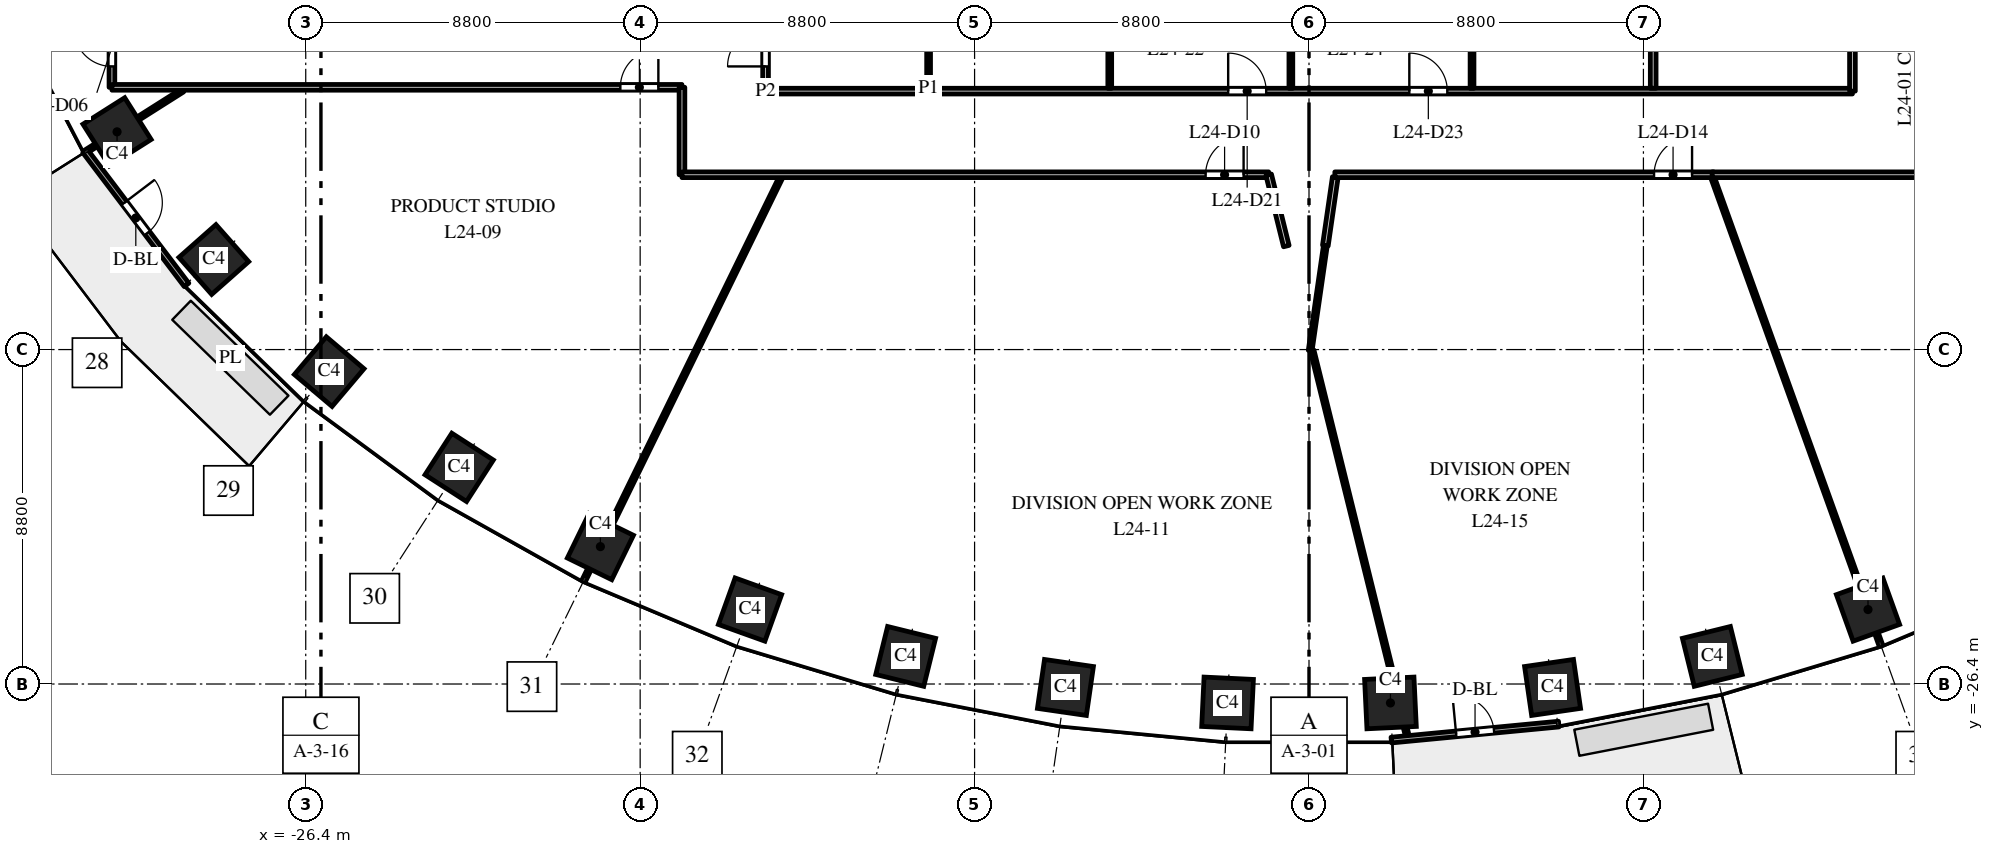
"""IFC4 building model, lengths in metres.
Left out: names, types, materials, properties, quantities, classifications, styles, units other than length and angle.
Written with IfcOpenShell. Run it as: python <this file> out.ifc"""

import sys

from ifc_helpers import new_model, si_unit, direction, frame, frame_2d, origin, origin_2d, place, context, subcontext, project, spatial, rectangle, extrude, element, fill, save


model = new_model("IFC4")
c1 = context("Model", 3, precision=1e-05, world=origin(), true_north=direction((0.0, 1.0)))
c2 = subcontext(c1, "Body", "Model", "MODEL_VIEW")
j1 = project(units=[si_unit("LENGTHUNIT", "METRE"), si_unit("PLANEANGLEUNIT", "RADIAN")], contexts=[c1])
p1 = place(None, origin())
s1 = spatial("IfcSite", under=j1, at=p1, CompositionType="ELEMENT")
p2 = place(p1, origin())
s2 = spatial("IfcBuilding", under=s1, at=p2, CompositionType="ELEMENT")
p3 = place(p2, frame((0.0, 0.0, 108.0)))
s3 = spatial("IfcBuildingStorey", under=s2, at=p3, CompositionType="ELEMENT", Elevation=108.0)
for number, where, z_axis, x_axis in (
    (1, (-31.365, -11.871, 0.0), (0.0, 0.0, 1.0), (0.535, -0.845, 0.0)),
    (2, (-28.819, -15.23, 0.0), (0.0, 0.0, 1.0), (0.663, -0.749, 0.0)),
    (3, (-25.783, -18.18, 0.0), (0.0, 0.0, 1.0), (0.763, -0.646, 0.0)),
    (4, (-22.362, -20.7, 0.0), (0.0, 0.0, 1.0), (0.84, -0.542, 0.0)),
    (5, (-18.646, -22.785, 0.0), (0.0, 0.0, 1.0), (0.898, -0.439, 0.0)),
    (6, (-14.709, -24.441, 0.0), (0.0, 0.0, 1.0), (0.941, -0.338, 0.0)),
    (7, (-10.613, -25.674, 0.0), (0.0, 0.0, 1.0), (0.971, -0.24, 0.0)),
    (8, (-6.409, -26.491, 0.0), (0.0, 0.0, 1.0), (0.99, -0.143, 0.0)),
    (9, (-2.143, -26.898, 0.0), (0.0, 0.0, 1.0), (0.999, -0.048, 0.0)),
    (10, (2.143, -26.898, 0.0), (0.0, 0.0, 1.0), (0.999, 0.048, 0.0)),
    (11, (6.409, -26.491, 0.0), (0.0, 0.0, 1.0), (0.99, 0.143, 0.0)),
    (12, (10.613, -25.674, 0.0), (0.0, 0.0, 1.0), (0.971, 0.24, 0.0)),
    (13, (14.709, -24.441, 0.0), (0.0, 0.0, 1.0), (0.941, 0.338, 0.0)),
):
    element("IfcColumn", number, at=place(p3, frame(where, z_axis=z_axis, x_axis=x_axis)), inside=s3, PredefinedType="COLUMN", context=c2, shape_type="SweptSolid", body=[
        extrude(rectangle(XDim=1.3, YDim=1.3, at=origin_2d()), origin(), (0.0, 0.0, 1.0), 4.0),
    ])
p4 = place(p3, frame((-32.208, -12.374, 0.0), z_axis=(0.0, 0.0, 1.0), x_axis=(0.604045763106, -0.796949632081, 0.0)))
e14 = element("IfcWall", 14, at=p4, inside=s3, PredefinedType="STANDARD", context=c2, shape_type="SweptSolid", body=[
    extrude(rectangle(XDim=4.423, YDim=0.15, at=frame_2d((2.212, 0.0))), origin(), (0.0, 0.0, 1.0), 3.7),
])
p5 = place(p4, frame((1.712, 0.0, 0.0)))
e15 = element("IfcOpeningElement", 15, at=p5, cuts=e14, PredefinedType="OPENING", context=c2, shape_type="SweptSolid", body=[
    extrude(rectangle(XDim=1.0, YDim=2.4, at=frame_2d((0.5, 1.2))), frame((0.0, 0.085, 0.0), z_axis=(0.0, -1.0, 0.0), x_axis=(1.0, 0.0, 0.0)), (0.0, 0.0, 1.0), 0.17),
])
p6 = place(p3, frame((2.166, -27.875, 0.0), z_axis=(0.0, 0.0, 1.0), x_axis=(0.995473879823, 0.095035543824, 0.0)))
e16 = element("IfcWall", 16, at=p6, inside=s3, PredefinedType="STANDARD", context=c2, shape_type="SweptSolid", body=[
    extrude(rectangle(XDim=4.426, YDim=0.15, at=frame_2d((2.213, 0.0))), origin(), (0.0, 0.0, 1.0), 3.7),
])
p7 = place(p6, frame((1.713, 0.0, 0.0)))
e17 = element("IfcOpeningElement", 17, at=p7, cuts=e16, PredefinedType="OPENING", context=c2, shape_type="SweptSolid", body=[
    extrude(rectangle(XDim=1.0, YDim=2.4, at=frame_2d((0.5, 1.2))), frame((0.0, 0.085, 0.0), z_axis=(0.0, -1.0, 0.0), x_axis=(1.0, 0.0, 0.0)), (0.0, 0.0, 1.0), 0.17),
])
p8 = place(p3, frame((-32.212, -12.408, 0.0), z_axis=(0.0, 0.0, 1.0), x_axis=(0.844810627195, 0.535065420467, 0.0)))
e18 = element("IfcWall", 18, at=p8, inside=s3, PredefinedType="PARTITIONING", context=c2, shape_type="SweptSolid", body=[
    extrude(rectangle(XDim=3.048, YDim=0.1, at=frame_2d((1.524, 0.0))), origin(), (0.0, 0.0, 1.0), 3.7),
])
p9 = place(p3, frame((-31.5, -10.7, 0.0), z_axis=(0.0, 0.0, 1.0), x_axis=(0.0, 1.0, 0.0)))
e19 = element("IfcWall", 19, at=p9, inside=s3, PredefinedType="PARTITIONING", context=c2, shape_type="SweptSolid", body=[
    extrude(rectangle(XDim=2.2, YDim=0.15, at=frame_2d((1.1, 0.0))), origin(), (0.0, 0.0, 1.0), 3.7),
])
p10 = place(p9, frame((0.55, 0.0, 0.0)))
e20 = element("IfcOpeningElement", 20, at=p10, cuts=e19, PredefinedType="OPENING", context=c2, shape_type="SweptSolid", body=[
    extrude(rectangle(XDim=1.0, YDim=2.1, at=frame_2d((0.5, 1.05))), frame((0.0, 0.085, 0.0), z_axis=(0.0, -1.0, 0.0), x_axis=(1.0, 0.0, 0.0)), (0.0, 0.0, 1.0), 0.17),
])
p11 = place(p3, frame((-31.5, -10.7, 0.0), z_axis=(0.0, 0.0, 1.0), x_axis=(1.0, 0.0, 0.0)))
e21 = element("IfcWall", 21, at=p11, inside=s3, PredefinedType="PARTITIONING", context=c2, shape_type="SweptSolid", body=[
    extrude(rectangle(XDim=15.0, YDim=0.15, at=frame_2d((7.5, 0.0))), origin(), (0.0, 0.0, 1.0), 3.1),
])
p12 = place(p11, frame((13.379, 0.0, 0.0)))
e22 = element("IfcOpeningElement", 22, at=p12, cuts=e21, PredefinedType="OPENING", context=c2, shape_type="SweptSolid", body=[
    extrude(rectangle(XDim=1.0, YDim=2.1, at=frame_2d((0.5, 1.05))), frame((0.0, 0.085, 0.0), z_axis=(0.0, -1.0, 0.0), x_axis=(1.0, 0.0, 0.0)), (0.0, 0.0, 1.0), 0.17),
])
p13 = place(p3, frame((-19.086, -23.685, 0.0), z_axis=(0.0, 0.0, 1.0), x_axis=(0.439199750603, 0.898389436197, 0.0)))
e23 = element("IfcWall", 23, at=p13, inside=s3, PredefinedType="PARTITIONING", context=c2, shape_type="SweptSolid", body=[
    extrude(rectangle(XDim=11.81, YDim=0.1, at=frame_2d((5.905, 0.0))), origin(), (0.0, 0.0, 1.0), 3.7),
])
p14 = place(p3, frame((-16.5, -13.0, 0.0), z_axis=(0.0, 0.0, 1.0), x_axis=(0.0, 1.0, 0.0)))
e24 = element("IfcWall", 24, at=p14, inside=s3, PredefinedType="PARTITIONING", context=c2, shape_type="SweptSolid", body=[
    extrude(rectangle(XDim=2.3, YDim=0.15, at=frame_2d((1.15, 0.0))), origin(), (0.0, 0.0, 1.0), 2.75),
])
p15 = place(p3, frame((-16.5, -13.0, 0.0), z_axis=(0.0, 0.0, 1.0), x_axis=(1.0, 0.0, 0.0)))
e25 = element("IfcWall", 25, at=p15, inside=s3, PredefinedType="PARTITIONING", context=c2, shape_type="SweptSolid", body=[
    extrude(rectangle(XDim=15.439, YDim=0.15, at=frame_2d((7.719, 0.0))), origin(), (0.0, 0.0, 1.0), 2.85),
])
p16 = place(p15, frame((13.779, 0.0, 0.0)))
e26 = element("IfcOpeningElement", 26, at=p16, cuts=e25, PredefinedType="OPENING", context=c2, shape_type="SweptSolid", body=[
    extrude(rectangle(XDim=1.0, YDim=2.1, at=frame_2d((0.5, 1.05))), frame((0.0, 0.085, 0.0), z_axis=(0.0, -1.0, 0.0), x_axis=(1.0, 0.0, 0.0)), (0.0, 0.0, 1.0), 0.17),
])
p17 = place(p3, frame((-14.3, -10.8, 0.0), z_axis=(0.0, 0.0, 1.0), x_axis=(0.0, 1.0, 0.0)))
e27 = element("IfcWall", 27, at=p17, inside=s3, PredefinedType="PARTITIONING", context=c2, shape_type="SweptSolid", body=[
    extrude(rectangle(XDim=21.6, YDim=0.15, at=frame_2d((10.8, 0.0))), origin(), (0.0, 0.0, 1.0), 2.75),
])
p18 = place(p17, frame((0.65, 0.0, 0.0)))
e28 = element("IfcOpeningElement", 28, at=p18, cuts=e27, PredefinedType="OPENING", context=c2, shape_type="SweptSolid", body=[
    extrude(rectangle(XDim=1.0, YDim=2.1, at=frame_2d((0.5, 1.05))), frame((0.0, 0.085, 0.0), z_axis=(0.0, -1.0, 0.0), x_axis=(1.0, 0.0, 0.0)), (0.0, 0.0, 1.0), 0.17),
])
p19 = place(p3, frame((-14.3, -10.8, 0.0), z_axis=(0.0, 0.0, 1.0), x_axis=(1.0, 0.0, 0.0)))
e29 = element("IfcWall", 29, at=p19, inside=s3, PredefinedType="PARTITIONING", context=c2, shape_type="SweptSolid", body=[
    extrude(rectangle(XDim=28.6, YDim=0.15, at=frame_2d((14.3, 0.0))), origin(), (0.0, 0.0, 1.0), 2.85),
])
p20 = place(p19, frame((12.173, 0.0, 0.0)))
e30 = element("IfcOpeningElement", 30, at=p20, cuts=e29, PredefinedType="OPENING", context=c2, shape_type="SweptSolid", body=[
    extrude(rectangle(XDim=1.0, YDim=2.1, at=frame_2d((0.5, 1.05))), frame((0.0, 0.085, 0.0), z_axis=(0.0, -1.0, 0.0), x_axis=(1.0, 0.0, 0.0)), (0.0, 0.0, 1.0), 0.17),
])
p21 = place(p19, frame((16.94, 0.0, 0.0)))
e31 = element("IfcOpeningElement", 31, at=p21, cuts=e29, PredefinedType="OPENING", context=c2, shape_type="SweptSolid", body=[
    extrude(rectangle(XDim=1.0, YDim=2.1, at=frame_2d((0.5, 1.05))), frame((0.0, 0.085, 0.0), z_axis=(0.0, -1.0, 0.0), x_axis=(1.0, 0.0, 0.0)), (0.0, 0.0, 1.0), 0.17),
])
p22 = place(p3, frame((-10.01, -10.725, 0.0), z_axis=(0.0, 0.0, 1.0), x_axis=(0.0, 1.0, 0.0)))
e32 = element("IfcWall", 32, at=p22, inside=s3, PredefinedType="PARTITIONING", context=c2, shape_type="SweptSolid", body=[
    extrude(rectangle(XDim=21.45, YDim=0.1, at=frame_2d((10.725, 0.0))), origin(), (0.0, 0.0, 1.0), 2.75),
])
p23 = place(p3, frame((-5.243, -10.725, 0.0), z_axis=(0.0, 0.0, 1.0), x_axis=(0.0, 1.0, 0.0)))
e33 = element("IfcWall", 33, at=p23, inside=s3, PredefinedType="PARTITIONING", context=c2, shape_type="SweptSolid", body=[
    extrude(rectangle(XDim=4.666, YDim=0.1, at=frame_2d((2.333, 0.0))), origin(), (0.0, 0.0, 1.0), 2.9),
])
p24 = place(p3, frame((-1.061, -13.0, 0.0), z_axis=(0.0, 0.0, 1.0), x_axis=(0.240039134513, -0.970763212067, 0.0)))
e34 = element("IfcWall", 34, at=p24, inside=s3, PredefinedType="PARTITIONING", context=c2, shape_type="SweptSolid", body=[
    extrude(rectangle(XDim=1.934, YDim=0.15, at=frame_2d((0.967, 0.0))), origin(), (0.0, 0.0, 1.0), 2.85),
])
p25 = place(p3, frame((-0.477, -10.725, 0.0), z_axis=(0.0, 0.0, 1.0), x_axis=(0.0, 1.0, 0.0)))
e35 = element("IfcWall", 35, at=p25, inside=s3, PredefinedType="PARTITIONING", context=c2, shape_type="SweptSolid", body=[
    extrude(rectangle(XDim=3.257, YDim=0.1, at=frame_2d((1.628, 0.0))), origin(), (0.0, 0.0, 1.0), 2.9),
])
p26 = place(p3, frame((0.031, -17.627, 0.0), z_axis=(0.0, 0.0, 1.0), x_axis=(0.143195777523, 0.989694381766, 0.0)))
e36 = element("IfcWall", 36, at=p26, inside=s3, PredefinedType="PARTITIONING", context=c2, shape_type="SweptSolid", body=[
    extrude(rectangle(XDim=2.793, YDim=0.1, at=frame_2d((1.396, 0.0))), origin(), (0.0, 0.0, 1.0), 3.7),
])
p27 = place(p3, frame((0.082, -17.625, 0.0), z_axis=(0.0, 0.0, 1.0), x_axis=(0.239733297303, -0.970838784847, 0.0)))
e37 = element("IfcWall", 37, at=p27, inside=s3, PredefinedType="PARTITIONING", context=c2, shape_type="SweptSolid", body=[
    extrude(rectangle(XDim=10.54, YDim=0.1, at=frame_2d((5.27, 0.0))), origin(), (0.0, 0.0, 1.0), 2.9),
])
p28 = place(p3, frame((0.43, -14.864, 0.0), z_axis=(0.0, 0.0, 1.0), x_axis=(0.143488136145, 0.989652037226, 0.0)))
e38 = element("IfcWall", 38, at=p28, inside=s3, PredefinedType="PARTITIONING", context=c2, shape_type="SweptSolid", body=[
    extrude(rectangle(XDim=1.819, YDim=0.15, at=frame_2d((0.909, 0.0))), origin(), (0.0, 0.0, 1.0), 3.7),
])
p29 = place(p3, frame((0.68, -13.0, 0.0), z_axis=(0.0, 0.0, 1.0), x_axis=(1.0, 0.0, 0.0)))
e39 = element("IfcWall", 39, at=p29, inside=s3, PredefinedType="PARTITIONING", context=c2, shape_type="SweptSolid", body=[
    extrude(rectangle(XDim=9.968, YDim=0.15, at=frame_2d((4.984, 0.0))), origin(), (0.0, 0.0, 1.0), 2.85),
])
p30 = place(p29, frame((8.4, 0.0, 0.0)))
e40 = element("IfcOpeningElement", 40, at=p30, cuts=e39, PredefinedType="OPENING", context=c2, shape_type="SweptSolid", body=[
    extrude(rectangle(XDim=1.0, YDim=2.1, at=frame_2d((0.5, 1.05))), frame((0.0, 0.085, 0.0), z_axis=(0.0, -1.0, 0.0), x_axis=(1.0, 0.0, 0.0)), (0.0, 0.0, 1.0), 0.17),
])
p31 = place(p3, frame((4.29, -10.725, 0.0), z_axis=(0.0, 0.0, 1.0), x_axis=(0.0, 1.0, 0.0)))
e41 = element("IfcWall", 41, at=p31, inside=s3, PredefinedType="PARTITIONING", context=c2, shape_type="SweptSolid", body=[
    extrude(rectangle(XDim=4.157, YDim=0.1, at=frame_2d((2.079, 0.0))), origin(), (0.0, 0.0, 1.0), 2.9),
])
p32 = place(p3, frame((9.057, -10.725, 0.0), z_axis=(0.0, 0.0, 1.0), x_axis=(0.0, 1.0, 0.0)))
e42 = element("IfcWall", 42, at=p32, inside=s3, PredefinedType="PARTITIONING", context=c2, shape_type="SweptSolid", body=[
    extrude(rectangle(XDim=10.68, YDim=0.15, at=frame_2d((5.34, 0.0))), origin(), (0.0, 0.0, 1.0), 2.75),
])
p33 = place(p32, frame((5.07, 0.0, 0.0)))
e43 = element("IfcOpeningElement", 43, at=p33, cuts=e42, PredefinedType="OPENING", context=c2, shape_type="SweptSolid", body=[
    extrude(rectangle(XDim=1.0, YDim=2.1, at=frame_2d((0.5, 1.05))), frame((0.0, 0.085, 0.0), z_axis=(0.0, -1.0, 0.0), x_axis=(1.0, 0.0, 0.0)), (0.0, 0.0, 1.0), 0.17),
])
p34 = place(p3, frame((10.622, -13.075, 0.0), z_axis=(0.0, 0.0, 1.0), x_axis=(0.338388305095, -0.941006564788, 0.0)))
e44 = element("IfcWall", 44, at=p34, inside=s3, PredefinedType="PARTITIONING", context=c2, shape_type="SweptSolid", body=[
    extrude(rectangle(XDim=13.08, YDim=0.1, at=frame_2d((6.54, 0.0))), origin(), (0.0, 0.0, 1.0), 2.85),
])
p35 = place(p3, frame((10.607, -13.0, 0.0), z_axis=(0.0, 0.0, 1.0), x_axis=(1.0, 0.0, 0.0)))
e45 = element("IfcWall", 45, at=p35, inside=s3, PredefinedType="PARTITIONING", context=c2, shape_type="SweptSolid", body=[
    extrude(rectangle(XDim=5.893, YDim=0.15, at=frame_2d((2.947, 0.0))), origin(), (0.0, 0.0, 1.0), 3.7),
])
p36 = place(p3, frame((14.3, -10.8, 0.0), z_axis=(0.0, 0.0, 1.0), x_axis=(0.0, 1.0, 0.0)))
e46 = element("IfcWall", 46, at=p36, inside=s3, PredefinedType="PARTITIONING", context=c2, shape_type="SweptSolid", body=[
    extrude(rectangle(XDim=21.6, YDim=0.15, at=frame_2d((10.8, 0.0))), origin(), (0.0, 0.0, 1.0), 2.75),
])
p37 = place(p36, frame((19.95, 0.0, 0.0)))
e47 = element("IfcOpeningElement", 47, at=p37, cuts=e46, PredefinedType="OPENING", context=c2, shape_type="SweptSolid", body=[
    extrude(rectangle(XDim=1.0, YDim=2.1, at=frame_2d((0.5, 1.05))), frame((0.0, 0.085, 0.0), z_axis=(0.0, -1.0, 0.0), x_axis=(1.0, 0.0, 0.0)), (0.0, 0.0, 1.0), 0.17),
])
p38 = place(p5, origin())
e48 = element("IfcDoor", 48, at=p38, inside=s3, OperationType="SINGLE_SWING_LEFT", PredefinedType="DOOR", context=c2, shape_type="SweptSolid", body=[
    extrude(rectangle(XDim=1.0, YDim=2.4, at=frame_2d((0.5, 1.2))), frame((0.0, 0.025, 0.0), z_axis=(0.0, -1.0, 0.0), x_axis=(1.0, 0.0, 0.0)), (0.0, 0.0, 1.0), 0.05),
])
fill(e15, e48)
p39 = place(p7, origin())
e49 = element("IfcDoor", 49, at=p39, inside=s3, OperationType="SINGLE_SWING_LEFT", PredefinedType="DOOR", context=c2, shape_type="SweptSolid", body=[
    extrude(rectangle(XDim=1.0, YDim=2.4, at=frame_2d((0.5, 1.2))), frame((0.0, 0.025, 0.0), z_axis=(0.0, -1.0, 0.0), x_axis=(1.0, 0.0, 0.0)), (0.0, 0.0, 1.0), 0.05),
])
fill(e17, e49)
p40 = place(p10, origin())
e50 = element("IfcDoor", 50, at=p40, inside=s3, OperationType="SINGLE_SWING_RIGHT", PredefinedType="DOOR", context=c2, shape_type="SweptSolid", body=[
    extrude(rectangle(XDim=1.0, YDim=2.1, at=frame_2d((0.5, 1.05))), frame((0.0, 0.025, 0.0), z_axis=(0.0, -1.0, 0.0), x_axis=(1.0, 0.0, 0.0)), (0.0, 0.0, 1.0), 0.05),
])
fill(e20, e50)
p41 = place(p12, origin())
e51 = element("IfcDoor", 51, at=p41, inside=s3, OperationType="SINGLE_SWING_RIGHT", PredefinedType="DOOR", context=c2, shape_type="SweptSolid", body=[
    extrude(rectangle(XDim=1.0, YDim=2.1, at=frame_2d((0.5, 1.05))), frame((0.0, 0.025, 0.0), z_axis=(0.0, -1.0, 0.0), x_axis=(1.0, 0.0, 0.0)), (0.0, 0.0, 1.0), 0.05),
])
fill(e22, e51)
p42 = place(p16, origin())
e52 = element("IfcDoor", 52, at=p42, inside=s3, OperationType="SINGLE_SWING_RIGHT", PredefinedType="DOOR", context=c2, shape_type="SweptSolid", body=[
    extrude(rectangle(XDim=1.0, YDim=2.1, at=frame_2d((0.5, 1.05))), frame((0.0, 0.025, 0.0), z_axis=(0.0, -1.0, 0.0), x_axis=(1.0, 0.0, 0.0)), (0.0, 0.0, 1.0), 0.05),
])
fill(e26, e52)
p43 = place(p30, origin())
e53 = element("IfcDoor", 53, at=p43, inside=s3, OperationType="SINGLE_SWING_RIGHT", PredefinedType="DOOR", context=c2, shape_type="SweptSolid", body=[
    extrude(rectangle(XDim=1.0, YDim=2.1, at=frame_2d((0.5, 1.05))), frame((0.0, 0.025, 0.0), z_axis=(0.0, -1.0, 0.0), x_axis=(1.0, 0.0, 0.0)), (0.0, 0.0, 1.0), 0.05),
])
fill(e40, e53)
p44 = place(p18, origin())
e54 = element("IfcDoor", 54, at=p44, inside=s3, OperationType="SINGLE_SWING_LEFT", PredefinedType="DOOR", context=c2, shape_type="SweptSolid", body=[
    extrude(rectangle(XDim=1.0, YDim=2.1, at=frame_2d((0.5, 1.05))), frame((0.0, 0.025, 0.0), z_axis=(0.0, -1.0, 0.0), x_axis=(1.0, 0.0, 0.0)), (0.0, 0.0, 1.0), 0.05),
])
fill(e28, e54)
p45 = place(p20, origin())
e55 = element("IfcDoor", 55, at=p45, inside=s3, OperationType="SINGLE_SWING_LEFT", PredefinedType="DOOR", context=c2, shape_type="SweptSolid", body=[
    extrude(rectangle(XDim=1.0, YDim=2.1, at=frame_2d((0.5, 1.05))), frame((0.0, 0.025, 0.0), z_axis=(0.0, -1.0, 0.0), x_axis=(1.0, 0.0, 0.0)), (0.0, 0.0, 1.0), 0.05),
])
fill(e30, e55)
p46 = place(p21, origin())
e56 = element("IfcDoor", 56, at=p46, inside=s3, OperationType="SINGLE_SWING_LEFT", PredefinedType="DOOR", context=c2, shape_type="SweptSolid", body=[
    extrude(rectangle(XDim=1.0, YDim=2.1, at=frame_2d((0.5, 1.05))), frame((0.0, 0.025, 0.0), z_axis=(0.0, -1.0, 0.0), x_axis=(1.0, 0.0, 0.0)), (0.0, 0.0, 1.0), 0.05),
])
fill(e31, e56)
save(model, sys.argv[1])
